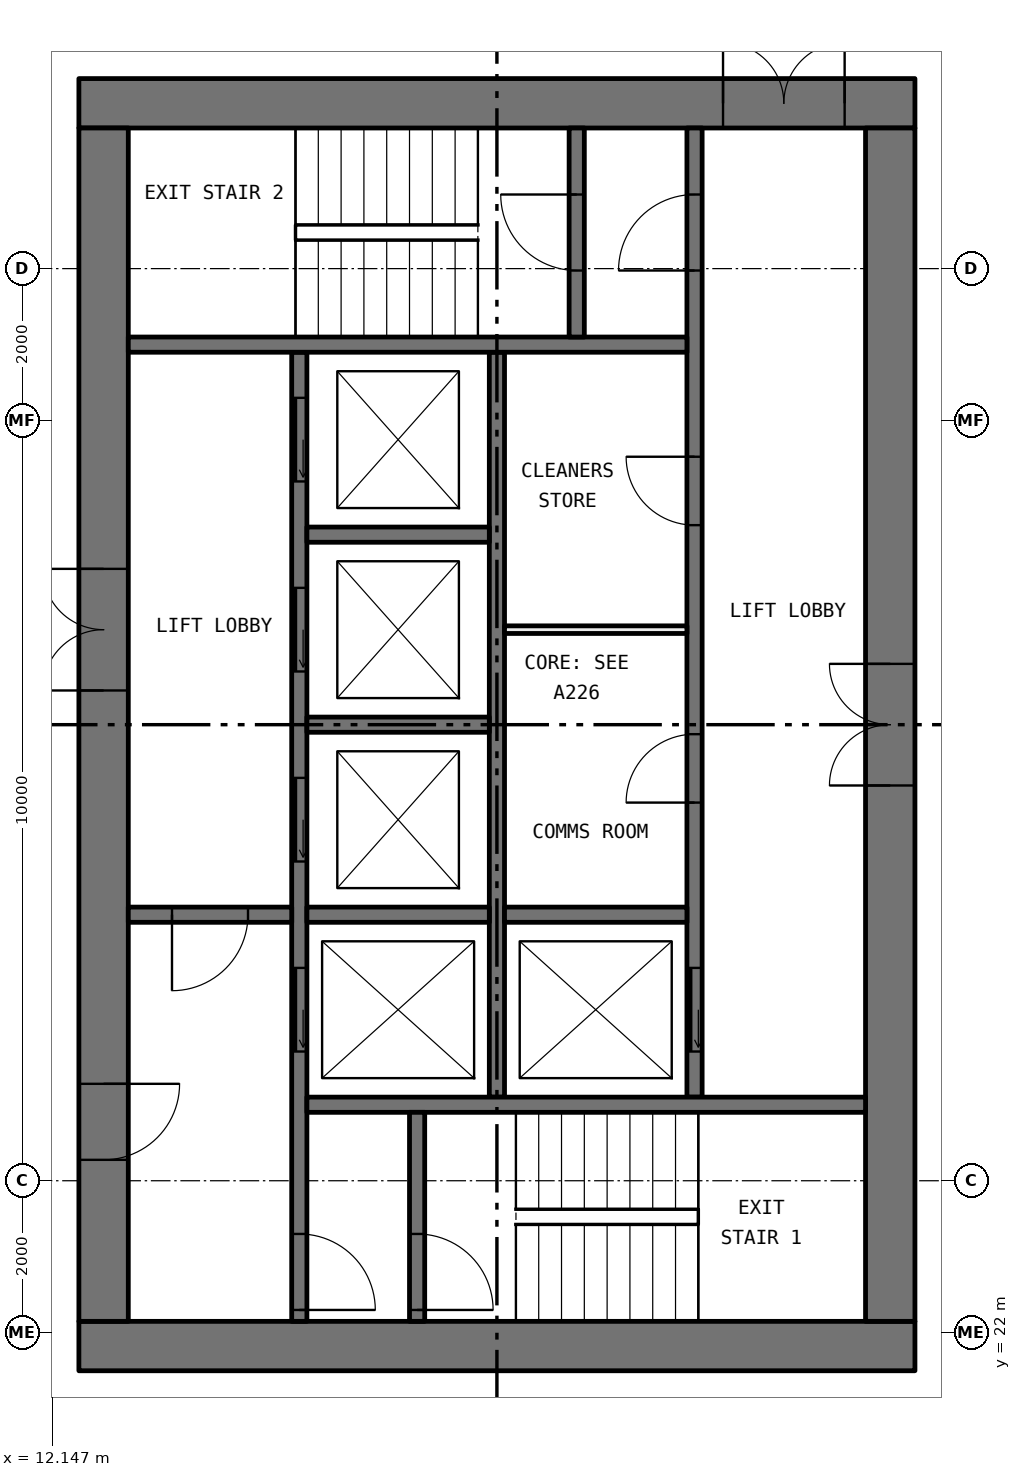
"""IFC4 building model, lengths in metres.
Left out: names, types, materials, properties, quantities, classifications, styles, units other than length and angle.
Written with IfcOpenShell. Run it as: python <this file> out.ifc"""

import sys

from ifc_helpers import new_model, si_unit, direction, frame, frame_2d, origin, place, context, subcontext, project, spatial, rectangle, extrude, element, fill, save


model = new_model("IFC4")
c1 = context("Model", 3, precision=1e-05, world=origin(), true_north=direction((0.0, 1.0)))
c2 = subcontext(c1, "Body", "Model", "MODEL_VIEW")
j1 = project(units=[si_unit("LENGTHUNIT", "METRE"), si_unit("PLANEANGLEUNIT", "RADIAN")], contexts=[c1])
p1 = place(None, origin())
s1 = spatial("IfcSite", under=j1, at=p1, CompositionType="ELEMENT")
p2 = place(p1, origin())
s2 = spatial("IfcBuilding", under=s1, at=p2, CompositionType="ELEMENT")
p3 = place(p2, frame((0.0, 0.0, 100.05)))
s3 = spatial("IfcBuildingStorey", under=s2, at=p3, CompositionType="ELEMENT", Elevation=100.05)
p4 = place(p3, frame((12.5, 21.825, 0.0), z_axis=(0.0, 0.0, 1.0), x_axis=(1.0, 0.0, 0.0)))
e1 = element("IfcWall", 1, at=p4, inside=s3, PredefinedType="SHEAR", context=c2, shape_type="SweptSolid", body=[
    extrude(rectangle(XDim=11.0, YDim=0.65, at=frame_2d((5.5, 0.0))), origin(), (0.0, 0.0, 1.0), 3.05),
])
p5 = place(p3, frame((12.5, 38.175, 0.0), z_axis=(0.0, 0.0, 1.0), x_axis=(1.0, 0.0, 0.0)))
e2 = element("IfcWall", 2, at=p5, inside=s3, PredefinedType="SHEAR", context=c2, shape_type="SweptSolid", body=[
    extrude(rectangle(XDim=11.0, YDim=0.65, at=frame_2d((5.5, 0.0))), origin(), (0.0, 0.0, 1.0), 3.05),
])
p6 = place(p5, frame((8.475, 0.0, 0.0)))
e3 = element("IfcOpeningElement", 3, at=p6, cuts=e2, PredefinedType="OPENING", context=c2, shape_type="SweptSolid", body=[
    extrude(rectangle(XDim=1.6, YDim=2.1, at=frame_2d((0.8, 1.05))), frame((0.0, 0.335, 0.0), z_axis=(0.0, -1.0, 0.0), x_axis=(1.0, 0.0, 0.0)), (0.0, 0.0, 1.0), 0.67),
])
p7 = place(p3, frame((12.825, 22.15, 0.0), z_axis=(0.0, 0.0, 1.0), x_axis=(0.0, 1.0, 0.0)))
e4 = element("IfcWall", 4, at=p7, inside=s3, PredefinedType="SHEAR", context=c2, shape_type="SweptSolid", body=[
    extrude(rectangle(XDim=15.7, YDim=0.65, at=frame_2d((7.85, 0.0))), origin(), (0.0, 0.0, 1.0), 3.05),
])
p8 = place(p7, frame((8.3, 0.0, 0.0)))
e5 = element("IfcOpeningElement", 5, at=p8, cuts=e4, PredefinedType="OPENING", context=c2, shape_type="SweptSolid", body=[
    extrude(rectangle(XDim=1.6, YDim=2.1, at=frame_2d((0.8, 1.05))), frame((0.0, 0.335, 0.0), z_axis=(0.0, -1.0, 0.0), x_axis=(1.0, 0.0, 0.0)), (0.0, 0.0, 1.0), 0.67),
])
p9 = place(p7, frame((2.125, 0.0, 0.0)))
e6 = element("IfcOpeningElement", 6, at=p9, cuts=e4, PredefinedType="OPENING", context=c2, shape_type="SweptSolid", body=[
    extrude(rectangle(XDim=1.0, YDim=2.1, at=frame_2d((0.5, 1.05))), frame((0.0, 0.335, 0.0), z_axis=(0.0, -1.0, 0.0), x_axis=(1.0, 0.0, 0.0)), (0.0, 0.0, 1.0), 0.67),
])
p10 = place(p3, frame((23.175, 22.15, 0.0), z_axis=(0.0, 0.0, 1.0), x_axis=(0.0, 1.0, 0.0)))
e7 = element("IfcWall", 7, at=p10, inside=s3, PredefinedType="SHEAR", context=c2, shape_type="SweptSolid", body=[
    extrude(rectangle(XDim=15.7, YDim=0.65, at=frame_2d((7.85, 0.0))), origin(), (0.0, 0.0, 1.0), 3.05),
])
p11 = place(p10, frame((7.05, 0.0, 0.0)))
e8 = element("IfcOpeningElement", 8, at=p11, cuts=e7, PredefinedType="OPENING", context=c2, shape_type="SweptSolid", body=[
    extrude(rectangle(XDim=1.6, YDim=2.1, at=frame_2d((0.8, 1.05))), frame((0.0, 0.335, 0.0), z_axis=(0.0, -1.0, 0.0), x_axis=(1.0, 0.0, 0.0)), (0.0, 0.0, 1.0), 0.67),
])
p12 = place(p3, frame((15.4, 22.15, 0.0), z_axis=(0.0, 0.0, 1.0), x_axis=(0.0, 1.0, 0.0)))
e9 = element("IfcWall", 9, at=p12, inside=s3, PredefinedType="SOLIDWALL", context=c2, shape_type="SweptSolid", body=[
    extrude(rectangle(XDim=12.75, YDim=0.2, at=frame_2d((6.375, 0.0))), origin(), (0.0, 0.0, 1.0), 3.05),
])
p13 = place(p12, frame((3.55, 0.0, 0.0)))
e10 = element("IfcOpeningElement", 10, at=p13, cuts=e9, PredefinedType="OPENING", context=c2, shape_type="SweptSolid", body=[
    extrude(rectangle(XDim=1.1, YDim=2.1, at=frame_2d((0.55, 1.05))), frame((0.0, 0.11, 0.0), z_axis=(0.0, -1.0, 0.0), x_axis=(1.0, 0.0, 0.0)), (0.0, 0.0, 1.0), 0.22),
])
p14 = place(p12, frame((6.05, 0.0, 0.0)))
e11 = element("IfcOpeningElement", 11, at=p14, cuts=e9, PredefinedType="OPENING", context=c2, shape_type="SweptSolid", body=[
    extrude(rectangle(XDim=1.1, YDim=2.1, at=frame_2d((0.55, 1.05))), frame((0.0, 0.11, 0.0), z_axis=(0.0, -1.0, 0.0), x_axis=(1.0, 0.0, 0.0)), (0.0, 0.0, 1.0), 0.22),
])
p15 = place(p12, frame((8.55, 0.0, 0.0)))
e12 = element("IfcOpeningElement", 12, at=p15, cuts=e9, PredefinedType="OPENING", context=c2, shape_type="SweptSolid", body=[
    extrude(rectangle(XDim=1.1, YDim=2.1, at=frame_2d((0.55, 1.05))), frame((0.0, 0.11, 0.0), z_axis=(0.0, -1.0, 0.0), x_axis=(1.0, 0.0, 0.0)), (0.0, 0.0, 1.0), 0.22),
])
p16 = place(p12, frame((11.05, 0.0, 0.0)))
e13 = element("IfcOpeningElement", 13, at=p16, cuts=e9, PredefinedType="OPENING", context=c2, shape_type="SweptSolid", body=[
    extrude(rectangle(XDim=1.1, YDim=2.1, at=frame_2d((0.55, 1.05))), frame((0.0, 0.11, 0.0), z_axis=(0.0, -1.0, 0.0), x_axis=(1.0, 0.0, 0.0)), (0.0, 0.0, 1.0), 0.22),
])
p17 = place(p12, frame((0.15, 0.0, 0.0)))
e14 = element("IfcOpeningElement", 14, at=p17, cuts=e9, PredefinedType="OPENING", context=c2, shape_type="SweptSolid", body=[
    extrude(rectangle(XDim=1.0, YDim=2.1, at=frame_2d((0.5, 1.05))), frame((0.0, 0.11, 0.0), z_axis=(0.0, -1.0, 0.0), x_axis=(1.0, 0.0, 0.0)), (0.0, 0.0, 1.0), 0.22),
])
p18 = place(p3, frame((20.6, 25.1, 0.0), z_axis=(0.0, 0.0, 1.0), x_axis=(0.0, 1.0, 0.0)))
e15 = element("IfcWall", 15, at=p18, inside=s3, PredefinedType="SOLIDWALL", context=c2, shape_type="SweptSolid", body=[
    extrude(rectangle(XDim=12.75, YDim=0.2, at=frame_2d((6.375, 0.0))), origin(), (0.0, 0.0, 1.0), 3.05),
])
p19 = place(p18, frame((0.6, 0.0, 0.0)))
e16 = element("IfcOpeningElement", 16, at=p19, cuts=e15, PredefinedType="OPENING", context=c2, shape_type="SweptSolid", body=[
    extrude(rectangle(XDim=1.1, YDim=2.1, at=frame_2d((0.55, 1.05))), frame((0.0, 0.11, 0.0), z_axis=(0.0, -1.0, 0.0), x_axis=(1.0, 0.0, 0.0)), (0.0, 0.0, 1.0), 0.22),
])
p20 = place(p18, frame((10.875, 0.0, 0.0)))
e17 = element("IfcOpeningElement", 17, at=p20, cuts=e15, PredefinedType="OPENING", context=c2, shape_type="SweptSolid", body=[
    extrude(rectangle(XDim=1.0, YDim=2.1, at=frame_2d((0.5, 1.05))), frame((0.0, 0.11, 0.0), z_axis=(0.0, -1.0, 0.0), x_axis=(1.0, 0.0, 0.0)), (0.0, 0.0, 1.0), 0.22),
])
p21 = place(p18, frame((3.875, 0.0, 0.0)))
e18 = element("IfcOpeningElement", 18, at=p21, cuts=e15, PredefinedType="OPENING", context=c2, shape_type="SweptSolid", body=[
    extrude(rectangle(XDim=0.9, YDim=2.1, at=frame_2d((0.45, 1.05))), frame((0.0, 0.11, 0.0), z_axis=(0.0, -1.0, 0.0), x_axis=(1.0, 0.0, 0.0)), (0.0, 0.0, 1.0), 0.22),
])
p22 = place(p18, frame((7.525, 0.0, 0.0)))
e19 = element("IfcOpeningElement", 19, at=p22, cuts=e15, PredefinedType="OPENING", context=c2, shape_type="SweptSolid", body=[
    extrude(rectangle(XDim=0.9, YDim=2.1, at=frame_2d((0.45, 1.05))), frame((0.0, 0.11, 0.0), z_axis=(0.0, -1.0, 0.0), x_axis=(1.0, 0.0, 0.0)), (0.0, 0.0, 1.0), 0.22),
])
p23 = place(p3, frame((18.0, 25.1, 0.0), z_axis=(0.0, 0.0, 1.0), x_axis=(0.0, 1.0, 0.0)))
e20 = element("IfcWall", 20, at=p23, inside=s3, PredefinedType="SOLIDWALL", context=c2, shape_type="SweptSolid", body=[
    extrude(rectangle(XDim=9.8, YDim=0.2, at=frame_2d((4.9, 0.0))), origin(), (0.0, 0.0, 1.0), 3.05),
])
for number, where, z_axis, x_axis in (
    (21, (15.5, 25.0, 0.0), (0.0, 0.0, 1.0), (1.0, 0.0, 0.0)),
    (22, (13.15, 35.0, 0.0), (0.0, 0.0, 1.0), (1.0, 0.0, 0.0)),
):
    element("IfcWall", number, at=place(p3, frame(where, z_axis=z_axis, x_axis=x_axis)), inside=s3, PredefinedType="SOLIDWALL", context=c2, shape_type="SweptSolid", body=[
        extrude(rectangle(XDim=7.35, YDim=0.2, at=frame_2d((3.675, 0.0))), origin(), (0.0, 0.0, 1.0), 3.05),
    ])
p24 = place(p3, frame((13.15, 27.5, 0.0), z_axis=(0.0, 0.0, 1.0), x_axis=(1.0, 0.0, 0.0)))
e23 = element("IfcWall", 23, at=p24, inside=s3, PredefinedType="SOLIDWALL", context=c2, shape_type="SweptSolid", body=[
    extrude(rectangle(XDim=2.15, YDim=0.2, at=frame_2d((1.075, 0.0))), origin(), (0.0, 0.0, 1.0), 3.05),
])
p25 = place(p24, frame((0.575, 0.0, 0.0)))
e24 = element("IfcOpeningElement", 24, at=p25, cuts=e23, PredefinedType="OPENING", context=c2, shape_type="SweptSolid", body=[
    extrude(rectangle(XDim=1.0, YDim=2.1, at=frame_2d((0.5, 1.05))), frame((0.0, 0.11, 0.0), z_axis=(0.0, -1.0, 0.0), x_axis=(1.0, 0.0, 0.0)), (0.0, 0.0, 1.0), 0.22),
])
p26 = place(p3, frame((16.95, 22.15, 0.0), z_axis=(0.0, 0.0, 1.0), x_axis=(0.0, 1.0, 0.0)))
e25 = element("IfcWall", 25, at=p26, inside=s3, PredefinedType="SOLIDWALL", context=c2, shape_type="SweptSolid", body=[
    extrude(rectangle(XDim=2.75, YDim=0.2, at=frame_2d((1.375, 0.0))), origin(), (0.0, 0.0, 1.0), 3.05),
])
p27 = place(p26, frame((0.15, 0.0, 0.0)))
e26 = element("IfcOpeningElement", 26, at=p27, cuts=e25, PredefinedType="OPENING", context=c2, shape_type="SweptSolid", body=[
    extrude(rectangle(XDim=1.0, YDim=2.1, at=frame_2d((0.5, 1.05))), frame((0.0, 0.11, 0.0), z_axis=(0.0, -1.0, 0.0), x_axis=(1.0, 0.0, 0.0)), (0.0, 0.0, 1.0), 0.22),
])
p28 = place(p3, frame((19.05, 35.1, 0.0), z_axis=(0.0, 0.0, 1.0), x_axis=(0.0, 1.0, 0.0)))
e27 = element("IfcWall", 27, at=p28, inside=s3, PredefinedType="SOLIDWALL", context=c2, shape_type="SweptSolid", body=[
    extrude(rectangle(XDim=2.75, YDim=0.2, at=frame_2d((1.375, 0.0))), origin(), (0.0, 0.0, 1.0), 3.05),
])
p29 = place(p28, frame((0.875, 0.0, 0.0)))
e28 = element("IfcOpeningElement", 28, at=p29, cuts=e27, PredefinedType="OPENING", context=c2, shape_type="SweptSolid", body=[
    extrude(rectangle(XDim=1.0, YDim=2.1, at=frame_2d((0.5, 1.05))), frame((0.0, 0.11, 0.0), z_axis=(0.0, -1.0, 0.0), x_axis=(1.0, 0.0, 0.0)), (0.0, 0.0, 1.0), 0.22),
])
for number, where, z_axis, x_axis in (
    (29, (15.5, 27.5, 0.0), (0.0, 0.0, 1.0), (1.0, 0.0, 0.0)),
    (30, (15.5, 30.0, 0.0), (0.0, 0.0, 1.0), (1.0, 0.0, 0.0)),
    (31, (15.5, 32.5, 0.0), (0.0, 0.0, 1.0), (1.0, 0.0, 0.0)),
    (32, (18.1, 27.5, 0.0), (0.0, 0.0, 1.0), (1.0, 0.0, 0.0)),
):
    element("IfcWall", number, at=place(p3, frame(where, z_axis=z_axis, x_axis=x_axis)), inside=s3, PredefinedType="SOLIDWALL", context=c2, shape_type="SweptSolid", body=[
        extrude(rectangle(XDim=2.4, YDim=0.2, at=frame_2d((1.2, 0.0))), origin(), (0.0, 0.0, 1.0), 3.05),
    ])
p30 = place(p3, frame((18.1, 31.25, 0.0), z_axis=(0.0, 0.0, 1.0), x_axis=(1.0, 0.0, 0.0)))
e33 = element("IfcWall", 33, at=p30, inside=s3, PredefinedType="PARTITIONING", context=c2, shape_type="SweptSolid", body=[
    extrude(rectangle(XDim=2.4, YDim=0.1, at=frame_2d((1.2, 0.0))), origin(), (0.0, 0.0, 1.0), 3.05),
])
p31 = place(p19, origin())
e34 = element("IfcDoor", 34, at=p31, inside=s3, OperationType="SLIDING_TO_LEFT", PredefinedType="DOOR", context=c2, shape_type="SweptSolid", body=[
    extrude(rectangle(XDim=1.1, YDim=2.1, at=frame_2d((0.55, 1.05))), frame((0.0, 0.025, 0.0), z_axis=(0.0, -1.0, 0.0), x_axis=(1.0, 0.0, 0.0)), (0.0, 0.0, 1.0), 0.05),
])
fill(e16, e34)
p32 = place(p13, origin())
e35 = element("IfcDoor", 35, at=p32, inside=s3, OperationType="SLIDING_TO_LEFT", PredefinedType="DOOR", context=c2, shape_type="SweptSolid", body=[
    extrude(rectangle(XDim=1.1, YDim=2.1, at=frame_2d((0.55, 1.05))), frame((0.0, 0.025, 0.0), z_axis=(0.0, -1.0, 0.0), x_axis=(1.0, 0.0, 0.0)), (0.0, 0.0, 1.0), 0.05),
])
fill(e10, e35)
p33 = place(p14, origin())
e36 = element("IfcDoor", 36, at=p33, inside=s3, OperationType="SLIDING_TO_LEFT", PredefinedType="DOOR", context=c2, shape_type="SweptSolid", body=[
    extrude(rectangle(XDim=1.1, YDim=2.1, at=frame_2d((0.55, 1.05))), frame((0.0, 0.025, 0.0), z_axis=(0.0, -1.0, 0.0), x_axis=(1.0, 0.0, 0.0)), (0.0, 0.0, 1.0), 0.05),
])
fill(e11, e36)
p34 = place(p15, origin())
e37 = element("IfcDoor", 37, at=p34, inside=s3, OperationType="SLIDING_TO_LEFT", PredefinedType="DOOR", context=c2, shape_type="SweptSolid", body=[
    extrude(rectangle(XDim=1.1, YDim=2.1, at=frame_2d((0.55, 1.05))), frame((0.0, 0.025, 0.0), z_axis=(0.0, -1.0, 0.0), x_axis=(1.0, 0.0, 0.0)), (0.0, 0.0, 1.0), 0.05),
])
fill(e12, e37)
p35 = place(p16, origin())
e38 = element("IfcDoor", 38, at=p35, inside=s3, OperationType="SLIDING_TO_LEFT", PredefinedType="DOOR", context=c2, shape_type="SweptSolid", body=[
    extrude(rectangle(XDim=1.1, YDim=2.1, at=frame_2d((0.55, 1.05))), frame((0.0, 0.025, 0.0), z_axis=(0.0, -1.0, 0.0), x_axis=(1.0, 0.0, 0.0)), (0.0, 0.0, 1.0), 0.05),
])
fill(e13, e38)
p36 = place(p27, frame((1.0, 0.0, 0.0), x_axis=(-1.0, 0.0, 0.0)))
e39 = element("IfcDoor", 39, at=p36, inside=s3, OperationType="SINGLE_SWING_LEFT", PredefinedType="DOOR", context=c2, shape_type="SweptSolid", body=[
    extrude(rectangle(XDim=1.0, YDim=2.1, at=frame_2d((0.5, 1.05))), frame((0.0, 0.025, 0.0), z_axis=(0.0, -1.0, 0.0), x_axis=(1.0, 0.0, 0.0)), (0.0, 0.0, 1.0), 0.05),
])
fill(e26, e39)
p37 = place(p17, frame((1.0, 0.0, 0.0), x_axis=(-1.0, 0.0, 0.0)))
e40 = element("IfcDoor", 40, at=p37, inside=s3, OperationType="SINGLE_SWING_LEFT", PredefinedType="DOOR", context=c2, shape_type="SweptSolid", body=[
    extrude(rectangle(XDim=1.0, YDim=2.1, at=frame_2d((0.5, 1.05))), frame((0.0, 0.025, 0.0), z_axis=(0.0, -1.0, 0.0), x_axis=(1.0, 0.0, 0.0)), (0.0, 0.0, 1.0), 0.05),
])
fill(e14, e40)
p38 = place(p20, origin())
e41 = element("IfcDoor", 41, at=p38, inside=s3, OperationType="SINGLE_SWING_RIGHT", PredefinedType="DOOR", context=c2, shape_type="SweptSolid", body=[
    extrude(rectangle(XDim=1.0, YDim=2.1, at=frame_2d((0.5, 1.05))), frame((0.0, 0.025, 0.0), z_axis=(0.0, -1.0, 0.0), x_axis=(1.0, 0.0, 0.0)), (0.0, 0.0, 1.0), 0.05),
])
fill(e17, e41)
p39 = place(p29, origin())
e42 = element("IfcDoor", 42, at=p39, inside=s3, OperationType="SINGLE_SWING_LEFT", PredefinedType="DOOR", context=c2, shape_type="SweptSolid", body=[
    extrude(rectangle(XDim=1.0, YDim=2.1, at=frame_2d((0.5, 1.05))), frame((0.0, 0.025, 0.0), z_axis=(0.0, -1.0, 0.0), x_axis=(1.0, 0.0, 0.0)), (0.0, 0.0, 1.0), 0.05),
])
fill(e28, e42)
p40 = place(p25, frame((1.0, 0.0, 0.0), x_axis=(-1.0, 0.0, 0.0)))
e43 = element("IfcDoor", 43, at=p40, inside=s3, OperationType="SINGLE_SWING_LEFT", PredefinedType="DOOR", context=c2, shape_type="SweptSolid", body=[
    extrude(rectangle(XDim=1.0, YDim=2.1, at=frame_2d((0.5, 1.05))), frame((0.0, 0.025, 0.0), z_axis=(0.0, -1.0, 0.0), x_axis=(1.0, 0.0, 0.0)), (0.0, 0.0, 1.0), 0.05),
])
fill(e24, e43)
p41 = place(p8, origin())
e44 = element("IfcDoor", 44, at=p41, inside=s3, OperationType="DOUBLE_DOOR_SINGLE_SWING", PredefinedType="DOOR", context=c2, shape_type="SweptSolid", body=[
    extrude(rectangle(XDim=1.6, YDim=2.1, at=frame_2d((0.8, 1.05))), frame((0.0, 0.025, 0.0), z_axis=(0.0, -1.0, 0.0), x_axis=(1.0, 0.0, 0.0)), (0.0, 0.0, 1.0), 0.05),
])
fill(e5, e44)
p42 = place(p9, frame((1.0, 0.0, 0.0), x_axis=(-1.0, 0.0, 0.0)))
e45 = element("IfcDoor", 45, at=p42, inside=s3, OperationType="SINGLE_SWING_RIGHT", PredefinedType="DOOR", context=c2, shape_type="SweptSolid", body=[
    extrude(rectangle(XDim=1.0, YDim=2.1, at=frame_2d((0.5, 1.05))), frame((0.0, 0.025, 0.0), z_axis=(0.0, -1.0, 0.0), x_axis=(1.0, 0.0, 0.0)), (0.0, 0.0, 1.0), 0.05),
])
fill(e6, e45)
p43 = place(p6, origin())
e46 = element("IfcDoor", 46, at=p43, inside=s3, OperationType="DOUBLE_DOOR_SINGLE_SWING", PredefinedType="DOOR", context=c2, shape_type="SweptSolid", body=[
    extrude(rectangle(XDim=1.6, YDim=2.1, at=frame_2d((0.8, 1.05))), frame((0.0, 0.025, 0.0), z_axis=(0.0, -1.0, 0.0), x_axis=(1.0, 0.0, 0.0)), (0.0, 0.0, 1.0), 0.05),
])
fill(e3, e46)
p44 = place(p11, origin())
e47 = element("IfcDoor", 47, at=p44, inside=s3, OperationType="DOUBLE_DOOR_SINGLE_SWING", PredefinedType="DOOR", context=c2, shape_type="SweptSolid", body=[
    extrude(rectangle(XDim=1.6, YDim=2.1, at=frame_2d((0.8, 1.05))), frame((0.0, 0.025, 0.0), z_axis=(0.0, -1.0, 0.0), x_axis=(1.0, 0.0, 0.0)), (0.0, 0.0, 1.0), 0.05),
])
fill(e8, e47)
p45 = place(p21, origin())
e48 = element("IfcDoor", 48, at=p45, inside=s3, OperationType="SINGLE_SWING_RIGHT", PredefinedType="DOOR", context=c2, shape_type="SweptSolid", body=[
    extrude(rectangle(XDim=0.9, YDim=2.1, at=frame_2d((0.45, 1.05))), frame((0.0, 0.025, 0.0), z_axis=(0.0, -1.0, 0.0), x_axis=(1.0, 0.0, 0.0)), (0.0, 0.0, 1.0), 0.05),
])
fill(e18, e48)
p46 = place(p22, origin())
e49 = element("IfcDoor", 49, at=p46, inside=s3, OperationType="SINGLE_SWING_LEFT", PredefinedType="DOOR", context=c2, shape_type="SweptSolid", body=[
    extrude(rectangle(XDim=0.9, YDim=2.1, at=frame_2d((0.45, 1.05))), frame((0.0, 0.025, 0.0), z_axis=(0.0, -1.0, 0.0), x_axis=(1.0, 0.0, 0.0)), (0.0, 0.0, 1.0), 0.05),
])
fill(e19, e49)
save(model, sys.argv[1])
